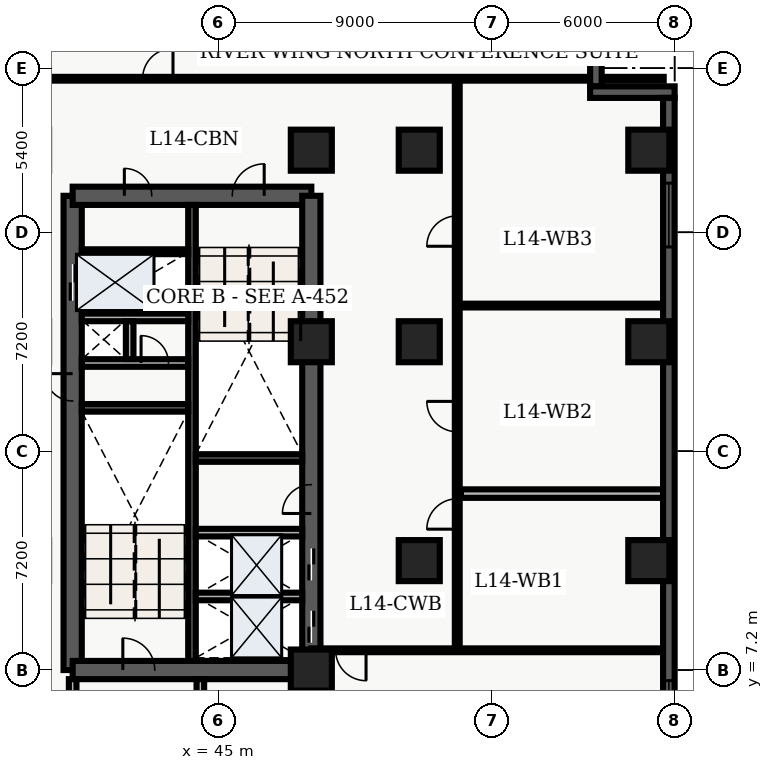
"""IFC4 building model, lengths in metres.
Left out: names, types, materials, properties, quantities, classifications, styles, units other than length and angle.
Written with IfcOpenShell. Run it as: python <this file> out.ifc"""

import sys

from ifc_helpers import new_model, entity, si_unit, converted_unit, direction, frame, origin_with_axes, origin_2d_with_axis, place, context, subcontext, project, spatial, polyline, rectangle, outline, extrude, element, fill, save


model = new_model("IFC4")
c1 = context("Model", 3, precision=1e-05, world=origin_with_axes(), true_north=direction((0.0, 1.0)))
c2 = subcontext(c1, "Body", "Model", "MODEL_VIEW")
j1 = project(units=[si_unit("LENGTHUNIT", "METRE"), converted_unit("PLANEANGLEUNIT", "DEGREE", entity("IfcPlaneAngleMeasure", 0.017), si_unit("PLANEANGLEUNIT", "RADIAN"), dimensions=[0, 0, 0, 0, 0, 0, 0])], contexts=[c1])
p1 = place(None, origin_with_axes())
s1 = spatial("IfcSite", under=j1, at=p1, CompositionType="ELEMENT")
p2 = place(p1, origin_with_axes())
s2 = spatial("IfcBuilding", under=s1, at=p2, CompositionType="ELEMENT")
p3 = place(p2, frame((0.0, 0.0, 60.0), z_axis=(0.0, 0.0, 1.0), x_axis=(1.0, 0.0, 0.0)))
s3 = spatial("IfcBuildingStorey", under=s2, at=p3, CompositionType="ELEMENT", Elevation=60.0)
p4 = place(p3, frame((40.2, 7.2, 0.0), z_axis=(0.0, 0.0, 1.0), x_axis=(0.0, 1.0, 0.0)))
e1 = element("IfcWall", 1, at=p4, inside=s3, PredefinedType="SHEAR", context=c2, shape_type="SweptSolid", body=[
    extrude(outline(polyline([(0.0, -0.3), (15.6, -0.3), (15.6, 0.3), (0.0, 0.3), (0.0, -0.3)])), origin_with_axes(), (0.0, 0.0, 1.0), 3.66),
])
p5 = place(p4, frame((12.75, 0.0, 0.0), z_axis=(0.0, 0.0, 1.0), x_axis=(1.0, 0.0, 0.0)))
e2 = element("IfcOpeningElement", 2, at=p5, cuts=e1, PredefinedType="OPENING", context=c2, shape_type="SweptSolid", body=[
    extrude(rectangle(XDim=1.2, YDim=0.62, at=origin_2d_with_axis()), origin_with_axes(), (0.0, 0.0, 1.0), 2.15),
])
p6 = place(p4, frame((9.3, 0.0, 0.0), z_axis=(0.0, 0.0, 1.0), x_axis=(1.0, 0.0, 0.0)))
e3 = element("IfcOpeningElement", 3, at=p6, cuts=e1, PredefinedType="OPENING", context=c2, shape_type="SweptSolid", body=[
    extrude(rectangle(XDim=0.9, YDim=0.62, at=origin_2d_with_axis()), origin_with_axes(), (0.0, 0.0, 1.0), 2.15),
])
p7 = place(p3, frame((40.2, 7.2, 0.0), z_axis=(0.0, 0.0, 1.0), x_axis=(1.0, 0.0, 0.0)))
e4 = element("IfcWall", 4, at=p7, inside=s3, PredefinedType="SHEAR", context=c2, shape_type="SweptSolid", body=[
    extrude(outline(polyline([(0.0, -0.3), (7.85, -0.3), (7.85, 0.3), (0.0, 0.3), (0.0, -0.3)])), origin_with_axes(), (0.0, 0.0, 1.0), 3.66),
])
p8 = place(p7, frame((2.175, 0.0, 0.0), z_axis=(0.0, 0.0, 1.0), x_axis=(1.0, 0.0, 0.0)))
e5 = element("IfcOpeningElement", 5, at=p8, cuts=e4, PredefinedType="OPENING", context=c2, shape_type="SweptSolid", body=[
    extrude(rectangle(XDim=1.05, YDim=0.62, at=origin_2d_with_axis()), origin_with_axes(), (0.0, 0.0, 1.0), 2.15),
])
p9 = place(p3, frame((40.2, 22.8, 0.0), z_axis=(0.0, 0.0, 1.0), x_axis=(1.0, 0.0, 0.0)))
e6 = element("IfcWall", 6, at=p9, inside=s3, PredefinedType="SHEAR", context=c2, shape_type="SweptSolid", body=[
    extrude(outline(polyline([(0.0, -0.3), (7.85, -0.3), (7.85, 0.3), (0.0, 0.3), (0.0, -0.3)])), origin_with_axes(), (0.0, 0.0, 1.0), 3.66),
])
p10 = place(p9, frame((5.775, 0.0, 0.0), z_axis=(0.0, 0.0, 1.0), x_axis=(1.0, 0.0, 0.0)))
e7 = element("IfcOpeningElement", 7, at=p10, cuts=e6, PredefinedType="OPENING", context=c2, shape_type="SweptSolid", body=[
    extrude(rectangle(XDim=1.05, YDim=0.62, at=origin_2d_with_axis()), origin_with_axes(), (0.0, 0.0, 1.0), 2.15),
])
p11 = place(p9, frame((2.15, 0.0, 0.0), z_axis=(0.0, 0.0, 1.0), x_axis=(1.0, 0.0, 0.0)))
e8 = element("IfcOpeningElement", 8, at=p11, cuts=e6, PredefinedType="OPENING", context=c2, shape_type="SweptSolid", body=[
    extrude(rectangle(XDim=0.9, YDim=0.62, at=origin_2d_with_axis()), origin_with_axes(), (0.0, 0.0, 1.0), 2.15),
])
p12 = place(p3, frame((48.05, 7.2, 0.0), z_axis=(0.0, 0.0, 1.0), x_axis=(0.0, 1.0, 0.0)))
e9 = element("IfcWall", 9, at=p12, inside=s3, PredefinedType="SHEAR", context=c2, shape_type="SweptSolid", body=[
    extrude(outline(polyline([(0.0, -0.3), (15.6, -0.3), (15.6, 0.3), (0.0, 0.3), (0.0, -0.3)])), origin_with_axes(), (0.0, 0.0, 1.0), 3.66),
])
p13 = place(p12, frame((1.425, 0.0, 0.0), z_axis=(0.0, 0.0, 1.0), x_axis=(1.0, 0.0, 0.0)))
e10 = element("IfcOpeningElement", 10, at=p13, cuts=e9, PredefinedType="OPENING", context=c2, shape_type="SweptSolid", body=[
    extrude(rectangle(XDim=1.05, YDim=0.62, at=origin_2d_with_axis()), origin_with_axes(), (0.0, 0.0, 1.0), 2.15),
])
p14 = place(p12, frame((3.475, 0.0, 0.0), z_axis=(0.0, 0.0, 1.0), x_axis=(1.0, 0.0, 0.0)))
e11 = element("IfcOpeningElement", 11, at=p14, cuts=e9, PredefinedType="OPENING", context=c2, shape_type="SweptSolid", body=[
    extrude(rectangle(XDim=1.05, YDim=0.62, at=origin_2d_with_axis()), origin_with_axes(), (0.0, 0.0, 1.0), 2.15),
])
p15 = place(p12, frame((5.625, 0.0, 0.0), z_axis=(0.0, 0.0, 1.0), x_axis=(1.0, 0.0, 0.0)))
e12 = element("IfcOpeningElement", 12, at=p15, cuts=e9, PredefinedType="OPENING", context=c2, shape_type="SweptSolid", body=[
    extrude(rectangle(XDim=0.95, YDim=0.62, at=origin_2d_with_axis()), origin_with_axes(), (0.0, 0.0, 1.0), 2.15),
])
p16 = place(p3, frame((44.125, 7.5, 0.0), z_axis=(0.0, 0.0, 1.0), x_axis=(0.0, 1.0, 0.0)))
e13 = element("IfcWall", 13, at=p16, inside=s3, PredefinedType="SHEAR", context=c2, shape_type="SweptSolid", body=[
    extrude(outline(polyline([(0.0, -0.125), (15.0, -0.125), (15.0, 0.125), (0.0, 0.125), (0.0, -0.125)])), origin_with_axes(), (0.0, 0.0, 1.0), 3.66),
])
for number, where, z_axis, x_axis in (
    (14, (40.5, 15.825, 0.0), (0.0, 0.0, 1.0), (1.0, 0.0, 0.0)),
    (15, (44.25, 14.175, 0.0), (0.0, 0.0, 1.0), (1.0, 0.0, 0.0)),
):
    element("IfcWall", number, at=place(p3, frame(where, z_axis=z_axis, x_axis=x_axis)), inside=s3, PredefinedType="SHEAR", context=c2, shape_type="SweptSolid", body=[
        extrude(outline(polyline([(0.0, -0.125), (3.5, -0.125), (3.5, 0.125), (0.0, 0.125), (0.0, -0.125)])), origin_with_axes(), (0.0, 0.0, 1.0), 3.66),
    ])
p17 = place(p3, frame((40.5, 17.3, 0.0), z_axis=(0.0, 0.0, 1.0), x_axis=(1.0, 0.0, 0.0)))
e16 = element("IfcWall", 16, at=p17, inside=s3, PredefinedType="SOLIDWALL", context=c2, shape_type="SweptSolid", body=[
    extrude(outline(polyline([(0.0, -0.125), (3.5, -0.125), (3.5, 0.125), (0.0, 0.125), (0.0, -0.125)])), origin_with_axes(), (0.0, 0.0, 1.0), 2.7),
])
p18 = place(p17, frame((2.4, 0.0, 0.0), z_axis=(0.0, 0.0, 1.0), x_axis=(1.0, 0.0, 0.0)))
e17 = element("IfcOpeningElement", 17, at=p18, cuts=e16, PredefinedType="OPENING", context=c2, shape_type="SweptSolid", body=[
    extrude(rectangle(XDim=0.9, YDim=0.27, at=origin_2d_with_axis()), origin_with_axes(), (0.0, 0.0, 1.0), 2.15),
])
p19 = place(p3, frame((40.5, 18.8, 0.0), z_axis=(0.0, 0.0, 1.0), x_axis=(1.0, 0.0, 0.0)))
e18 = element("IfcWall", 18, at=p19, inside=s3, PredefinedType="SOLIDWALL", context=c2, shape_type="SweptSolid", body=[
    extrude(outline(polyline([(0.0, -0.125), (3.5, -0.125), (3.5, 0.125), (0.0, 0.125), (0.0, -0.125)])), origin_with_axes(), (0.0, 0.0, 1.0), 2.7),
])
p20 = place(p3, frame((42.075, 17.43, 0.0), z_axis=(0.0, 0.0, 1.0), x_axis=(0.0, 1.0, 0.0)))
e19 = element("IfcWall", 19, at=p20, inside=s3, PredefinedType="SOLIDWALL", context=c2, shape_type="SweptSolid", body=[
    extrude(outline(polyline([(0.0, -0.125), (1.24, -0.125), (1.24, 0.125), (0.0, 0.125), (0.0, -0.125)])), origin_with_axes(), (0.0, 0.0, 1.0), 2.7),
])
p21 = place(p3, frame((40.2, 3.1, 0.0), z_axis=(0.0, 0.0, 1.0), x_axis=(0.0, 1.0, 0.0)))
e20 = element("IfcWall", 20, at=p21, inside=s3, PredefinedType="SOLIDWALL", context=c2, shape_type="SweptSolid", body=[
    extrude(outline(polyline([(0.0, -0.125), (3.8, -0.125), (3.8, 0.125), (0.0, 0.125), (0.0, -0.125)])), origin_with_axes(), (0.0, 0.0, 1.0), 2.7),
])
p22 = place(p21, frame((2.075, 0.0, 0.0), z_axis=(0.0, 0.0, 1.0), x_axis=(1.0, 0.0, 0.0)))
e21 = element("IfcOpeningElement", 21, at=p22, cuts=e20, PredefinedType="OPENING", context=c2, shape_type="SweptSolid", body=[
    extrude(rectangle(XDim=1.05, YDim=0.27, at=origin_2d_with_axis()), origin_with_axes(), (0.0, 0.0, 1.0), 2.15),
])
p23 = place(p3, frame((44.4, 3.1, 0.0), z_axis=(0.0, 0.0, 1.0), x_axis=(0.0, 1.0, 0.0)))
e22 = element("IfcWall", 22, at=p23, inside=s3, PredefinedType="SOLIDWALL", context=c2, shape_type="SweptSolid", body=[
    extrude(outline(polyline([(0.0, -0.125), (3.8, -0.125), (3.8, 0.125), (0.0, 0.125), (0.0, -0.125)])), origin_with_axes(), (0.0, 0.0, 1.0), 2.7),
])
for number, where, z_axis, x_axis in (
    (23, (48.05, 7.2, 0.0), (0.0, 0.0, 1.0), (1.0, 0.0, 0.0)),
    (24, (48.05, 18.0, 0.0), (0.0, 0.0, 1.0), (1.0, 0.0, 0.0)),
    (25, (48.05, 24.3, 0.0), (0.0, 0.0, 1.0), (1.0, 0.0, 0.0)),
    (26, (51.6, 10.8, 0.0), (0.0, 0.0, 1.0), (1.0, 0.0, 0.0)),
    (27, (51.6, 18.0, 0.0), (0.0, 0.0, 1.0), (1.0, 0.0, 0.0)),
    (28, (51.6, 24.3, 0.0), (0.0, 0.0, 1.0), (1.0, 0.0, 0.0)),
    (29, (59.15, 10.8, 0.0), (0.0, 0.0, 1.0), (1.0, 0.0, 0.0)),
    (30, (59.15, 18.0, 0.0), (0.0, 0.0, 1.0), (1.0, 0.0, 0.0)),
    (31, (59.15, 24.3, 0.0), (0.0, 0.0, 1.0), (1.0, 0.0, 0.0)),
):
    element("IfcColumn", number, at=place(p3, frame(where, z_axis=z_axis, x_axis=x_axis)), inside=s3, PredefinedType="COLUMN", context=c2, shape_type="SweptSolid", body=[
        extrude(rectangle(XDim=1.35, YDim=1.35, at=origin_2d_with_axis()), origin_with_axes(), (0.0, 0.0, 1.0), 3.9),
    ])
p24 = place(p3, frame((40.5, 20.96, 0.0), z_axis=(0.0, 0.0, 1.0), x_axis=(1.0, 0.0, 0.0)))
e32 = element("IfcWall", 32, at=p24, inside=s3, PredefinedType="PARTITIONING", context=c2, shape_type="SweptSolid", body=[
    extrude(outline(polyline([(0.0, -0.08), (3.5, -0.08), (3.5, 0.08), (0.0, 0.08), (0.0, -0.08)])), origin_with_axes(), (0.0, 0.0, 1.0), 2.7),
])
for number, where, z_axis, x_axis in (
    (33, (44.25, 9.62, 0.0), (0.0, 0.0, 1.0), (1.0, 0.0, 0.0)),
    (34, (44.25, 11.72, 0.0), (0.0, 0.0, 1.0), (1.0, 0.0, 0.0)),
):
    element("IfcWall", number, at=place(p3, frame(where, z_axis=z_axis, x_axis=x_axis)), inside=s3, PredefinedType="SOLIDWALL", context=c2, shape_type="SweptSolid", body=[
        extrude(outline(polyline([(0.0, -0.125), (3.5, -0.125), (3.5, 0.125), (0.0, 0.125), (0.0, -0.125)])), origin_with_axes(), (0.0, 0.0, 1.0), 2.7),
    ])
p25 = place(p3, frame((52.85, 7.85, 0.0), z_axis=(0.0, 0.0, 1.0), x_axis=(0.0, 1.0, 0.0)))
e35 = element("IfcWall", 35, at=p25, inside=s3, PredefinedType="PARTITIONING", context=c2, shape_type="SweptSolid", body=[
    extrude(outline(polyline([(0.0, -0.08), (18.8, -0.08), (18.8, 0.08), (0.0, 0.08), (0.0, -0.08)])), origin_with_axes(), (0.0, 0.0, 1.0), 2.7),
])
p26 = place(p25, frame((4.484, 0.0, 0.0), z_axis=(0.0, 0.0, 1.0), x_axis=(1.0, 0.0, 0.0)))
e36 = element("IfcOpeningElement", 36, at=p26, cuts=e35, PredefinedType="OPENING", context=c2, shape_type="SweptSolid", body=[
    extrude(rectangle(XDim=1.0, YDim=0.18, at=origin_2d_with_axis()), origin_with_axes(), (0.0, 0.0, 1.0), 2.15),
])
p27 = place(p25, frame((7.687, 0.0, 0.0), z_axis=(0.0, 0.0, 1.0), x_axis=(1.0, 0.0, 0.0)))
e37 = element("IfcOpeningElement", 37, at=p27, cuts=e35, PredefinedType="OPENING", context=c2, shape_type="SweptSolid", body=[
    extrude(rectangle(XDim=1.0, YDim=0.18, at=origin_2d_with_axis()), origin_with_axes(), (0.0, 0.0, 1.0), 2.15),
])
p28 = place(p25, frame((13.79, 0.0, 0.0), z_axis=(0.0, 0.0, 1.0), x_axis=(1.0, 0.0, 0.0)))
e38 = element("IfcOpeningElement", 38, at=p28, cuts=e35, PredefinedType="OPENING", context=c2, shape_type="SweptSolid", body=[
    extrude(rectangle(XDim=1.0, YDim=0.18, at=origin_2d_with_axis()), origin_with_axes(), (0.0, 0.0, 1.0), 2.15),
])
p29 = place(p3, frame((59.64, 7.85, 0.0), z_axis=(0.0, 0.0, 1.0), x_axis=(-1.0, 0.0, 0.0)))
e39 = element("IfcWall", 39, at=p29, inside=s3, PredefinedType="PARTITIONING", context=c2, shape_type="SweptSolid", body=[
    extrude(outline(polyline([(0.0, -0.062), (11.59, -0.062), (11.59, 0.062), (0.0, 0.062), (0.0, -0.062)])), origin_with_axes(), (0.0, 0.0, 1.0), 2.7),
])
p30 = place(p29, frame((10.29, 0.0, 0.0), z_axis=(0.0, 0.0, 1.0), x_axis=(1.0, 0.0, 0.0)))
e40 = element("IfcOpeningElement", 40, at=p30, cuts=e39, PredefinedType="OPENING", context=c2, shape_type="SweptSolid", body=[
    extrude(rectangle(XDim=1.0, YDim=0.145, at=origin_2d_with_axis()), origin_with_axes(), (0.0, 0.0, 1.0), 2.15),
])
p31 = place(p3, frame((38.76, 26.65, 0.0), z_axis=(0.0, 0.0, 1.0), x_axis=(1.0, 0.0, 0.0)))
e41 = element("IfcWall", 41, at=p31, inside=s3, PredefinedType="PARTITIONING", context=c2, shape_type="SweptSolid", body=[
    extrude(outline(polyline([(0.0, -0.062), (20.88, -0.062), (20.88, 0.062), (0.0, 0.062), (0.0, -0.062)])), origin_with_axes(), (0.0, 0.0, 1.0), 2.7),
])
p32 = place(p31, frame((4.24, 0.0, 0.0), z_axis=(0.0, 0.0, 1.0), x_axis=(1.0, 0.0, 0.0)))
e42 = element("IfcOpeningElement", 42, at=p32, cuts=e41, PredefinedType="OPENING", context=c2, shape_type="SweptSolid", body=[
    extrude(rectangle(XDim=1.0, YDim=0.145, at=origin_2d_with_axis()), origin_with_axes(), (0.0, 0.0, 1.0), 2.15),
])
p33 = place(p3, frame((52.97, 13.004, 0.0), z_axis=(0.0, 0.0, 1.0), x_axis=(1.0, 0.0, 0.0)))
e43 = element("IfcWall", 43, at=p33, inside=s3, PredefinedType="PARTITIONING", context=c2, shape_type="SweptSolid", body=[
    extrude(outline(polyline([(0.0, -0.14), (6.655, -0.14), (6.655, 0.14), (0.0, 0.14), (0.0, -0.14)])), origin_with_axes(), (0.0, 0.0, 1.0), 2.7),
])
p34 = place(p3, frame((52.97, 19.189, 0.0), z_axis=(0.0, 0.0, 1.0), x_axis=(1.0, 0.0, 0.0)))
e44 = element("IfcWall", 44, at=p34, inside=s3, PredefinedType="PARTITIONING", context=c2, shape_type="SweptSolid", body=[
    extrude(outline(polyline([(0.0, -0.062), (6.655, -0.062), (6.655, 0.062), (0.0, 0.062), (0.0, -0.062)])), origin_with_axes(), (0.0, 0.0, 1.0), 2.7),
])
p35 = place(p3, frame((57.41, 28.42, 0.0), z_axis=(0.0, 0.0, 1.0), x_axis=(0.0, -1.0, 0.0)))
e45 = element("IfcWall", 45, at=p35, inside=s3, PredefinedType="SOLIDWALL", context=c2, shape_type="SweptSolid", body=[
    extrude(outline(polyline([(0.0, -0.19), (2.02, -0.19), (2.02, 0.19), (0.0, 0.19), (0.0, -0.19)])), origin_with_axes(), (0.0, 0.0, 1.0), 3.66),
])
p36 = place(p3, frame((57.22, 26.21, 0.0), z_axis=(0.0, 0.0, 1.0), x_axis=(1.0, 0.0, 0.0)))
e46 = element("IfcWall", 46, at=p36, inside=s3, PredefinedType="SOLIDWALL", context=c2, shape_type="SweptSolid", body=[
    extrude(outline(polyline([(0.0, -0.19), (2.78, -0.19), (2.78, 0.19), (0.0, 0.19), (0.0, -0.19)])), origin_with_axes(), (0.0, 0.0, 1.0), 3.66),
])
p37 = place(p3, frame((59.81, 26.02, 0.0), z_axis=(0.0, 0.0, 1.0), x_axis=(0.0, -1.0, 0.0)))
e47 = element("IfcWall", 47, at=p37, inside=s3, PredefinedType="SOLIDWALL", context=c2, shape_type="SweptSolid", body=[
    extrude(outline(polyline([(0.0, -0.19), (23.62, -0.19), (23.62, 0.19), (0.0, 0.19), (0.0, -0.19)])), origin_with_axes(), (0.0, 0.0, 1.0), 3.66),
])
p38 = place(p37, frame((3.853, 0.0, 0.45), z_axis=(0.0, 0.0, 1.0), x_axis=(1.0, 0.0, 0.0)))
e48 = element("IfcOpeningElement", 48, at=p38, cuts=e47, PredefinedType="OPENING", context=c2, shape_type="SweptSolid", body=[
    extrude(rectangle(XDim=2.1, YDim=0.4, at=origin_2d_with_axis()), origin_with_axes(), (0.0, 0.0, 1.0), 2.2),
])
p39 = place(p37, frame((20.218, 0.0, 0.45), z_axis=(0.0, 0.0, 1.0), x_axis=(1.0, 0.0, 0.0)))
e49 = element("IfcOpeningElement", 49, at=p39, cuts=e47, PredefinedType="OPENING", context=c2, shape_type="SweptSolid", body=[
    extrude(rectangle(XDim=2.1, YDim=0.4, at=origin_2d_with_axis()), origin_with_axes(), (0.0, 0.0, 1.0), 2.2),
])
p40 = place(p12, frame((1.425, 0.0, 0.0), z_axis=(0.0, 0.0, 1.0), x_axis=(1.0, 0.0, 0.0)))
e50 = element("IfcDoor", 50, at=p40, inside=s3, OperationType="SLIDING_TO_LEFT", PredefinedType="DOOR", context=c2, shape_type="SweptSolid", body=[
    extrude(rectangle(XDim=1.05, YDim=0.09, at=origin_2d_with_axis()), origin_with_axes(), (0.0, 0.0, 1.0), 2.15),
])
fill(e10, e50)
p41 = place(p12, frame((3.475, 0.0, 0.0), z_axis=(0.0, 0.0, 1.0), x_axis=(1.0, 0.0, 0.0)))
e51 = element("IfcDoor", 51, at=p41, inside=s3, OperationType="SLIDING_TO_RIGHT", PredefinedType="DOOR", context=c2, shape_type="SweptSolid", body=[
    extrude(rectangle(XDim=1.05, YDim=0.09, at=origin_2d_with_axis()), origin_with_axes(), (0.0, 0.0, 1.0), 2.15),
])
fill(e11, e51)
p42 = place(p4, frame((12.75, 0.0, 0.0), z_axis=(0.0, 0.0, 1.0), x_axis=(1.0, 0.0, 0.0)))
e52 = element("IfcDoor", 52, at=p42, inside=s3, OperationType="DOUBLE_DOOR_SLIDING", PredefinedType="DOOR", context=c2, shape_type="SweptSolid", body=[
    extrude(rectangle(XDim=1.2, YDim=0.09, at=origin_2d_with_axis()), origin_with_axes(), (0.0, 0.0, 1.0), 2.15),
])
fill(e2, e52)
p43 = place(p4, frame((9.3, 0.0, 0.0), z_axis=(0.0, 0.0, 1.0), x_axis=(1.0, 0.0, 0.0)))
e53 = element("IfcDoor", 53, at=p43, inside=s3, OperationType="SINGLE_SWING_RIGHT", PredefinedType="DOOR", context=c2, shape_type="SweptSolid", body=[
    extrude(rectangle(XDim=0.9, YDim=0.09, at=origin_2d_with_axis()), origin_with_axes(), (0.0, 0.0, 1.0), 2.15),
])
fill(e3, e53)
p44 = place(p17, frame((2.4, 0.0, 0.0), z_axis=(0.0, 0.0, 1.0), x_axis=(1.0, 0.0, 0.0)))
e54 = element("IfcDoor", 54, at=p44, inside=s3, OperationType="SINGLE_SWING_LEFT", PredefinedType="DOOR", context=c2, shape_type="SweptSolid", body=[
    extrude(rectangle(XDim=0.9, YDim=0.09, at=origin_2d_with_axis()), origin_with_axes(), (0.0, 0.0, 1.0), 2.15),
])
fill(e17, e54)
p45 = place(p7, frame((2.175, 0.0, 0.0), z_axis=(0.0, 0.0, 1.0), x_axis=(1.0, 0.0, 0.0)))
e55 = element("IfcDoor", 55, at=p45, inside=s3, OperationType="SINGLE_SWING_LEFT", PredefinedType="DOOR", context=c2, shape_type="SweptSolid", body=[
    extrude(rectangle(XDim=1.05, YDim=0.09, at=origin_2d_with_axis()), origin_with_axes(), (0.0, 0.0, 1.0), 2.15),
])
fill(e5, e55)
p46 = place(p9, frame((5.775, 0.0, 0.0), z_axis=(0.0, 0.0, 1.0), x_axis=(1.0, 0.0, 0.0)))
e56 = element("IfcDoor", 56, at=p46, inside=s3, OperationType="SINGLE_SWING_RIGHT", PredefinedType="DOOR", context=c2, shape_type="SweptSolid", body=[
    extrude(rectangle(XDim=1.05, YDim=0.09, at=origin_2d_with_axis()), origin_with_axes(), (0.0, 0.0, 1.0), 2.15),
])
fill(e7, e56)
p47 = place(p9, frame((2.15, 0.0, 0.0), z_axis=(0.0, 0.0, 1.0), x_axis=(1.0, 0.0, 0.0)))
e57 = element("IfcDoor", 57, at=p47, inside=s3, OperationType="SINGLE_SWING_LEFT", PredefinedType="DOOR", context=c2, shape_type="SweptSolid", body=[
    extrude(rectangle(XDim=0.9, YDim=0.09, at=origin_2d_with_axis()), origin_with_axes(), (0.0, 0.0, 1.0), 2.15),
])
fill(e8, e57)
p48 = place(p12, frame((5.625, 0.0, 0.0), z_axis=(0.0, 0.0, 1.0), x_axis=(1.0, 0.0, 0.0)))
e58 = element("IfcDoor", 58, at=p48, inside=s3, OperationType="SINGLE_SWING_LEFT", PredefinedType="DOOR", context=c2, shape_type="SweptSolid", body=[
    extrude(rectangle(XDim=0.95, YDim=0.09, at=origin_2d_with_axis()), origin_with_axes(), (0.0, 0.0, 1.0), 2.15),
])
fill(e12, e58)
p49 = place(p29, frame((10.29, 0.0, 0.0), z_axis=(0.0, 0.0, 1.0), x_axis=(1.0, 0.0, 0.0)))
e59 = element("IfcDoor", 59, at=p49, inside=s3, OperationType="SINGLE_SWING_LEFT", PredefinedType="DOOR", context=c2, shape_type="SweptSolid", body=[
    extrude(rectangle(XDim=1.0, YDim=0.075, at=origin_2d_with_axis()), origin_with_axes(), (0.0, 0.0, 1.0), 2.15),
])
fill(e40, e59)
p50 = place(p31, frame((4.24, 0.0, 0.0), z_axis=(0.0, 0.0, 1.0), x_axis=(1.0, 0.0, 0.0)))
e60 = element("IfcDoor", 60, at=p50, inside=s3, OperationType="SINGLE_SWING_RIGHT", PredefinedType="DOOR", context=c2, shape_type="SweptSolid", body=[
    extrude(rectangle(XDim=1.0, YDim=0.075, at=origin_2d_with_axis()), origin_with_axes(), (0.0, 0.0, 1.0), 2.15),
])
fill(e42, e60)
p51 = place(p25, frame((4.484, 0.0, 0.0), z_axis=(0.0, 0.0, 1.0), x_axis=(1.0, 0.0, 0.0)))
e61 = element("IfcDoor", 61, at=p51, inside=s3, OperationType="SINGLE_SWING_LEFT", PredefinedType="DOOR", context=c2, shape_type="SweptSolid", body=[
    extrude(rectangle(XDim=1.0, YDim=0.09, at=origin_2d_with_axis()), origin_with_axes(), (0.0, 0.0, 1.0), 2.15),
])
fill(e36, e61)
p52 = place(p25, frame((7.687, 0.0, 0.0), z_axis=(0.0, 0.0, 1.0), x_axis=(1.0, 0.0, 0.0)))
e62 = element("IfcDoor", 62, at=p52, inside=s3, OperationType="SINGLE_SWING_RIGHT", PredefinedType="DOOR", context=c2, shape_type="SweptSolid", body=[
    extrude(rectangle(XDim=1.0, YDim=0.09, at=origin_2d_with_axis()), origin_with_axes(), (0.0, 0.0, 1.0), 2.15),
])
fill(e37, e62)
p53 = place(p25, frame((13.79, 0.0, 0.0), z_axis=(0.0, 0.0, 1.0), x_axis=(1.0, 0.0, 0.0)))
e63 = element("IfcDoor", 63, at=p53, inside=s3, OperationType="SINGLE_SWING_LEFT", PredefinedType="DOOR", context=c2, shape_type="SweptSolid", body=[
    extrude(rectangle(XDim=1.0, YDim=0.09, at=origin_2d_with_axis()), origin_with_axes(), (0.0, 0.0, 1.0), 2.15),
])
fill(e38, e63)
p54 = place(p37, frame((3.853, 0.0, 0.45), z_axis=(0.0, 0.0, 1.0), x_axis=(1.0, 0.0, 0.0)))
e64 = element("IfcWindow", 64, at=p54, inside=s3, PredefinedType="WINDOW", context=c2, shape_type="SweptSolid", body=[
    extrude(rectangle(XDim=2.1, YDim=0.09, at=origin_2d_with_axis()), origin_with_axes(), (0.0, 0.0, 1.0), 2.2),
])
fill(e48, e64)
p55 = place(p37, frame((20.218, 0.0, 0.45), z_axis=(0.0, 0.0, 1.0), x_axis=(1.0, 0.0, 0.0)))
e65 = element("IfcWindow", 65, at=p55, inside=s3, PredefinedType="WINDOW", context=c2, shape_type="SweptSolid", body=[
    extrude(rectangle(XDim=2.1, YDim=0.09, at=origin_2d_with_axis()), origin_with_axes(), (0.0, 0.0, 1.0), 2.2),
])
fill(e49, e65)
save(model, sys.argv[1])
